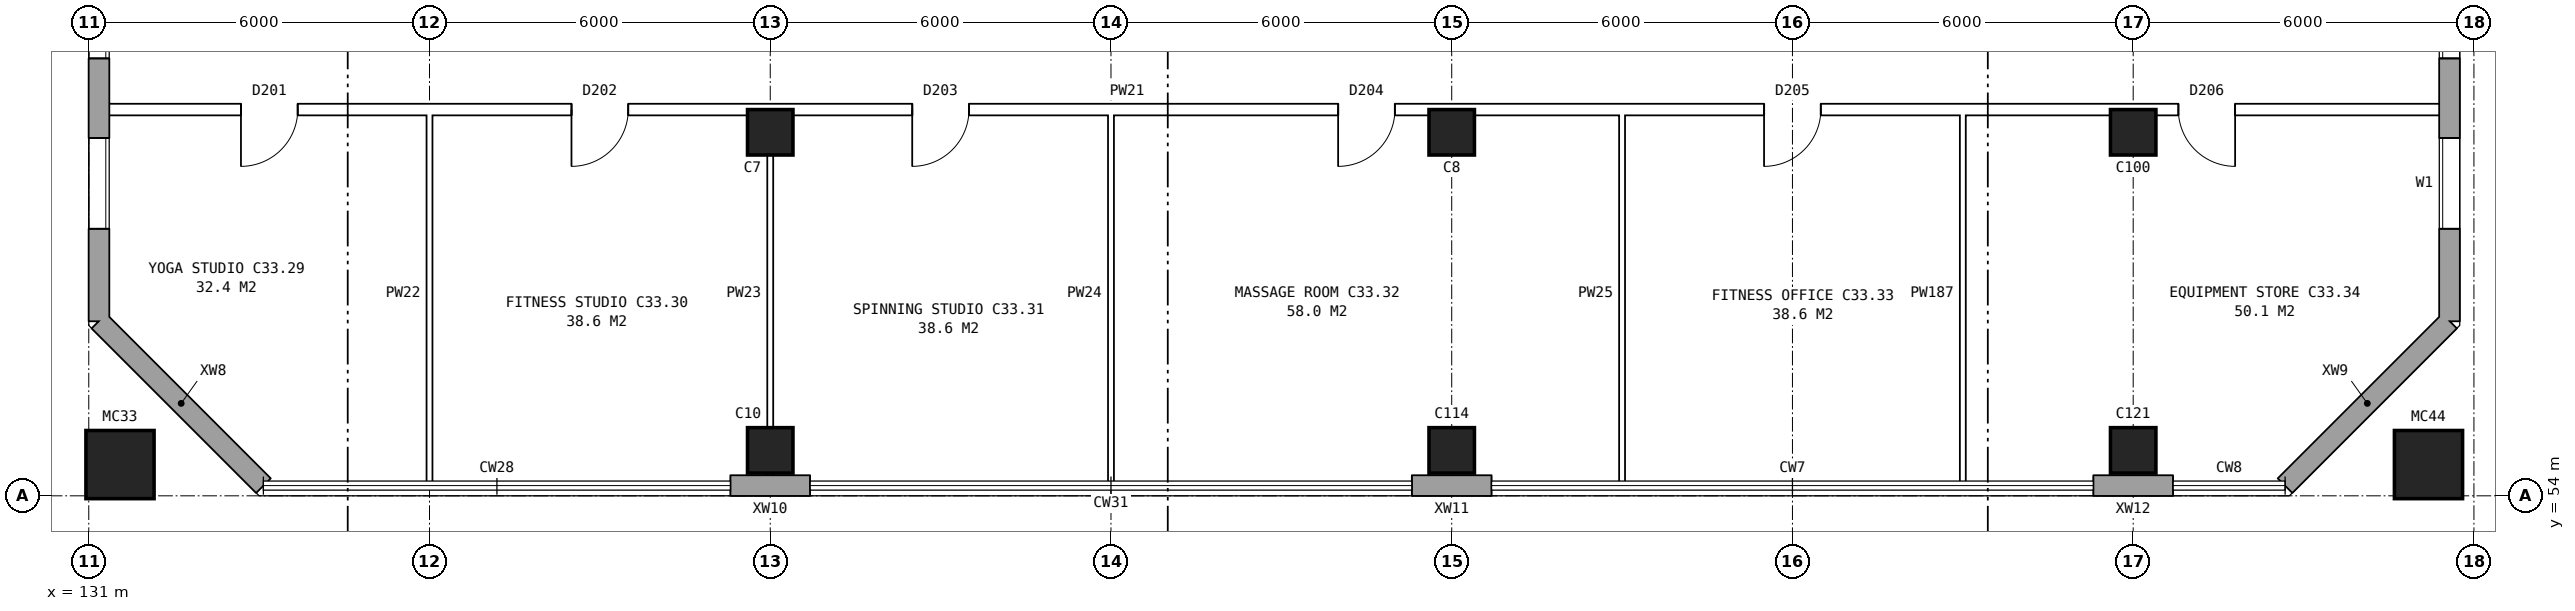
"""IFC4 building model, lengths in metres.
Left out: names, types, materials, properties, quantities, classifications, styles, units other than length and angle.
Written with IfcOpenShell. Run it as: python <this file> out.ifc"""

import sys

from ifc_helpers import new_model, si_unit, direction, frame, frame_2d, origin, origin_2d, place, context, subcontext, project, spatial, rectangle, hollow_rectangle, extrude, element, fill, save


model = new_model("IFC4")
c1 = context("Model", 3, precision=1e-05, world=origin(), true_north=direction((0.0, 1.0)))
c2 = subcontext(c1, "Body", "Model", "MODEL_VIEW")
j1 = project(units=[si_unit("LENGTHUNIT", "METRE"), si_unit("PLANEANGLEUNIT", "RADIAN")], contexts=[c1])
p1 = place(None, origin())
s1 = spatial("IfcSite", under=j1, at=p1, CompositionType="ELEMENT")
p2 = place(p1, origin())
s2 = spatial("IfcBuilding", under=s1, at=p2, CompositionType="ELEMENT")
p3 = place(p2, frame((0.0, 0.0, 119.5)))
s3 = spatial("IfcBuildingStorey", under=s2, at=p3, CompositionType="ELEMENT", Elevation=119.5)
for number, where, z_axis, x_axis in (
    (1, (143.0, 54.8, 0.0), (0.0, 0.0, 1.0), (1.0, 0.0, 0.0)),
    (2, (143.0, 60.4, 0.0), (0.0, 0.0, 1.0), (1.0, 0.0, 0.0)),
    (3, (155.0, 54.8, 0.0), (0.0, 0.0, 1.0), (1.0, 0.0, 0.0)),
    (4, (155.0, 60.4, 0.0), (0.0, 0.0, 1.0), (1.0, 0.0, 0.0)),
    (5, (167.0, 54.8, 0.0), (0.0, 0.0, 1.0), (1.0, 0.0, 0.0)),
    (6, (167.0, 60.4, 0.0), (0.0, 0.0, 1.0), (1.0, 0.0, 0.0)),
):
    element("IfcColumn", number, at=place(p3, frame(where, z_axis=z_axis, x_axis=x_axis)), inside=s3, PredefinedType="COLUMN", context=c2, shape_type="SweptSolid", body=[
        extrude(rectangle(XDim=0.8, YDim=0.8, at=origin_2d()), origin(), (0.0, 0.0, 1.0), 3.6),
    ])
for number, where, z_axis, x_axis in (
    (7, (131.55, 54.55, 0.0), (0.0, 0.0, 1.0), (1.0, 0.0, 0.0)),
    (8, (172.2, 54.55, 0.0), (0.0, 0.0, 1.0), (1.0, 0.0, 0.0)),
):
    element("IfcColumn", number, at=place(p3, frame(where, z_axis=z_axis, x_axis=x_axis)), inside=s3, PredefinedType="COLUMN", context=c2, shape_type="SweptSolid", body=[
        extrude(hollow_rectangle(XDim=1.2, YDim=1.2, WallThickness=0.065, at=origin_2d()), origin(), (0.0, 0.0, 1.0), 4.2),
    ])
p4 = place(p3, frame((131.18, 57.075, 0.0), z_axis=(0.0, 0.0, 1.0), x_axis=(0.707106781187, -0.707106781187, 0.0)))
e9 = element("IfcWall", 9, at=p4, inside=s3, PredefinedType="STANDARD", context=c2, shape_type="SweptSolid", body=[
    extrude(rectangle(XDim=4.094, YDim=0.36, at=frame_2d((2.047, 0.0))), origin(), (0.0, 0.0, 1.0), 3.6),
])
for number, where, z_axis, x_axis in (
    (10, (142.3, 54.18, 0.0), (0.0, 0.0, 1.0), (1.0, 0.0, 0.0)),
    (11, (154.3, 54.18, 0.0), (0.0, 0.0, 1.0), (1.0, 0.0, 0.0)),
    (12, (166.3, 54.18, 0.0), (0.0, 0.0, 1.0), (1.0, 0.0, 0.0)),
):
    element("IfcWall", number, at=place(p3, frame(where, z_axis=z_axis, x_axis=x_axis)), inside=s3, PredefinedType="STANDARD", context=c2, shape_type="SweptSolid", body=[
        extrude(rectangle(XDim=1.4, YDim=0.36, at=frame_2d((0.7, 0.0))), origin(), (0.0, 0.0, 1.0), 3.6),
    ])
p5 = place(p3, frame((169.675, 54.18, 0.0), z_axis=(0.0, 0.0, 1.0), x_axis=(0.707106781187, 0.707106781187, 0.0)))
e13 = element("IfcWall", 13, at=p5, inside=s3, PredefinedType="STANDARD", context=c2, shape_type="SweptSolid", body=[
    extrude(rectangle(XDim=4.094, YDim=0.36, at=frame_2d((2.047, 0.0))), origin(), (0.0, 0.0, 1.0), 3.6),
])
p6 = place(p3, frame((172.57, 57.075, 0.0), z_axis=(0.0, 0.0, 1.0), x_axis=(0.0, 1.0, 0.0)))
e14 = element("IfcWall", 14, at=p6, inside=s3, PredefinedType="STANDARD", context=c2, shape_type="SweptSolid", body=[
    extrude(rectangle(XDim=25.851, YDim=0.36, at=frame_2d((12.925, 0.0))), origin(), (0.0, 0.0, 1.0), 3.6),
])
p7 = place(p6, frame((1.625, 0.0, 0.8)))
e15 = element("IfcOpeningElement", 15, at=p7, cuts=e14, PredefinedType="OPENING", context=c2, shape_type="SweptSolid", body=[
    extrude(rectangle(XDim=1.6, YDim=1.8, at=frame_2d((0.8, 0.9))), frame((0.0, 0.19, 0.0), z_axis=(0.0, -1.0, 0.0), x_axis=(1.0, 0.0, 0.0)), (0.0, 0.0, 1.0), 0.38),
])
p8 = place(p6, frame((4.625, 0.0, 0.8)))
e16 = element("IfcOpeningElement", 16, at=p8, cuts=e14, PredefinedType="OPENING", context=c2, shape_type="SweptSolid", body=[
    extrude(rectangle(XDim=1.6, YDim=1.8, at=frame_2d((0.8, 0.9))), frame((0.0, 0.19, 0.0), z_axis=(0.0, -1.0, 0.0), x_axis=(1.0, 0.0, 0.0)), (0.0, 0.0, 1.0), 0.38),
])
p9 = place(p6, frame((7.625, 0.0, 0.8)))
e17 = element("IfcOpeningElement", 17, at=p9, cuts=e14, PredefinedType="OPENING", context=c2, shape_type="SweptSolid", body=[
    extrude(rectangle(XDim=1.6, YDim=1.8, at=frame_2d((0.8, 0.9))), frame((0.0, 0.19, 0.0), z_axis=(0.0, -1.0, 0.0), x_axis=(1.0, 0.0, 0.0)), (0.0, 0.0, 1.0), 0.38),
])
p10 = place(p6, frame((10.625, 0.0, 0.8)))
e18 = element("IfcOpeningElement", 18, at=p10, cuts=e14, PredefinedType="OPENING", context=c2, shape_type="SweptSolid", body=[
    extrude(rectangle(XDim=1.6, YDim=1.8, at=frame_2d((0.8, 0.9))), frame((0.0, 0.19, 0.0), z_axis=(0.0, -1.0, 0.0), x_axis=(1.0, 0.0, 0.0)), (0.0, 0.0, 1.0), 0.38),
])
p11 = place(p6, frame((13.625, 0.0, 0.8)))
e19 = element("IfcOpeningElement", 19, at=p11, cuts=e14, PredefinedType="OPENING", context=c2, shape_type="SweptSolid", body=[
    extrude(rectangle(XDim=1.6, YDim=1.8, at=frame_2d((0.8, 0.9))), frame((0.0, 0.19, 0.0), z_axis=(0.0, -1.0, 0.0), x_axis=(1.0, 0.0, 0.0)), (0.0, 0.0, 1.0), 0.38),
])
p12 = place(p6, frame((16.625, 0.0, 0.8)))
e20 = element("IfcOpeningElement", 20, at=p12, cuts=e14, PredefinedType="OPENING", context=c2, shape_type="SweptSolid", body=[
    extrude(rectangle(XDim=1.6, YDim=1.8, at=frame_2d((0.8, 0.9))), frame((0.0, 0.19, 0.0), z_axis=(0.0, -1.0, 0.0), x_axis=(1.0, 0.0, 0.0)), (0.0, 0.0, 1.0), 0.38),
])
p13 = place(p6, frame((19.625, 0.0, 0.8)))
e21 = element("IfcOpeningElement", 21, at=p13, cuts=e14, PredefinedType="OPENING", context=c2, shape_type="SweptSolid", body=[
    extrude(rectangle(XDim=1.6, YDim=1.8, at=frame_2d((0.8, 0.9))), frame((0.0, 0.19, 0.0), z_axis=(0.0, -1.0, 0.0), x_axis=(1.0, 0.0, 0.0)), (0.0, 0.0, 1.0), 0.38),
])
p14 = place(p6, frame((22.625, 0.0, 0.8)))
e22 = element("IfcOpeningElement", 22, at=p14, cuts=e14, PredefinedType="OPENING", context=c2, shape_type="SweptSolid", body=[
    extrude(rectangle(XDim=1.6, YDim=1.8, at=frame_2d((0.8, 0.9))), frame((0.0, 0.19, 0.0), z_axis=(0.0, -1.0, 0.0), x_axis=(1.0, 0.0, 0.0)), (0.0, 0.0, 1.0), 0.38),
])
p15 = place(p3, frame((131.18, 82.925, 0.0), z_axis=(0.0, 0.0, 1.0), x_axis=(0.0, -1.0, 0.0)))
e23 = element("IfcWall", 23, at=p15, inside=s3, PredefinedType="STANDARD", context=c2, shape_type="SweptSolid", body=[
    extrude(rectangle(XDim=25.851, YDim=0.36, at=frame_2d((12.925, 0.0))), origin(), (0.0, 0.0, 1.0), 3.6),
])
p16 = place(p15, frame((1.625, 0.0, 0.8)))
e24 = element("IfcOpeningElement", 24, at=p16, cuts=e23, PredefinedType="OPENING", context=c2, shape_type="SweptSolid", body=[
    extrude(rectangle(XDim=1.6, YDim=1.8, at=frame_2d((0.8, 0.9))), frame((0.0, 0.19, 0.0), z_axis=(0.0, -1.0, 0.0), x_axis=(1.0, 0.0, 0.0)), (0.0, 0.0, 1.0), 0.38),
])
p17 = place(p15, frame((4.625, 0.0, 0.8)))
e25 = element("IfcOpeningElement", 25, at=p17, cuts=e23, PredefinedType="OPENING", context=c2, shape_type="SweptSolid", body=[
    extrude(rectangle(XDim=1.6, YDim=1.8, at=frame_2d((0.8, 0.9))), frame((0.0, 0.19, 0.0), z_axis=(0.0, -1.0, 0.0), x_axis=(1.0, 0.0, 0.0)), (0.0, 0.0, 1.0), 0.38),
])
p18 = place(p15, frame((19.625, 0.0, 0.8)))
e26 = element("IfcOpeningElement", 26, at=p18, cuts=e23, PredefinedType="OPENING", context=c2, shape_type="SweptSolid", body=[
    extrude(rectangle(XDim=1.6, YDim=1.8, at=frame_2d((0.8, 0.9))), frame((0.0, 0.19, 0.0), z_axis=(0.0, -1.0, 0.0), x_axis=(1.0, 0.0, 0.0)), (0.0, 0.0, 1.0), 0.38),
])
p19 = place(p15, frame((22.625, 0.0, 0.8)))
e27 = element("IfcOpeningElement", 27, at=p19, cuts=e23, PredefinedType="OPENING", context=c2, shape_type="SweptSolid", body=[
    extrude(rectangle(XDim=1.6, YDim=1.8, at=frame_2d((0.8, 0.9))), frame((0.0, 0.19, 0.0), z_axis=(0.0, -1.0, 0.0), x_axis=(1.0, 0.0, 0.0)), (0.0, 0.0, 1.0), 0.38),
])
p20 = place(p3, frame((131.24, 60.8, 0.0), z_axis=(0.0, 0.0, 1.0), x_axis=(1.0, 0.0, 0.0)))
e28 = element("IfcWall", 28, at=p20, inside=s3, PredefinedType="PARTITIONING", context=c2, shape_type="SweptSolid", body=[
    extrude(rectangle(XDim=41.27, YDim=0.2, at=frame_2d((20.635, 0.0))), origin(), (0.0, 0.0, 1.0), 3.6),
])
p21 = place(p20, frame((2.44, 0.0, 0.0)))
e29 = element("IfcOpeningElement", 29, at=p21, cuts=e28, PredefinedType="OPENING", context=c2, shape_type="SweptSolid", body=[
    extrude(rectangle(XDim=1.0, YDim=2.1, at=frame_2d((0.5, 1.05))), frame((0.0, 0.11, 0.0), z_axis=(0.0, -1.0, 0.0), x_axis=(1.0, 0.0, 0.0)), (0.0, 0.0, 1.0), 0.22),
])
p22 = place(p20, frame((8.26, 0.0, 0.0)))
e30 = element("IfcOpeningElement", 30, at=p22, cuts=e28, PredefinedType="OPENING", context=c2, shape_type="SweptSolid", body=[
    extrude(rectangle(XDim=1.0, YDim=2.1, at=frame_2d((0.5, 1.05))), frame((0.0, 0.11, 0.0), z_axis=(0.0, -1.0, 0.0), x_axis=(1.0, 0.0, 0.0)), (0.0, 0.0, 1.0), 0.22),
])
p23 = place(p20, frame((14.26, 0.0, 0.0)))
e31 = element("IfcOpeningElement", 31, at=p23, cuts=e28, PredefinedType="OPENING", context=c2, shape_type="SweptSolid", body=[
    extrude(rectangle(XDim=1.0, YDim=2.1, at=frame_2d((0.5, 1.05))), frame((0.0, 0.11, 0.0), z_axis=(0.0, -1.0, 0.0), x_axis=(1.0, 0.0, 0.0)), (0.0, 0.0, 1.0), 0.22),
])
p24 = place(p20, frame((21.76, 0.0, 0.0)))
e32 = element("IfcOpeningElement", 32, at=p24, cuts=e28, PredefinedType="OPENING", context=c2, shape_type="SweptSolid", body=[
    extrude(rectangle(XDim=1.0, YDim=2.1, at=frame_2d((0.5, 1.05))), frame((0.0, 0.11, 0.0), z_axis=(0.0, -1.0, 0.0), x_axis=(1.0, 0.0, 0.0)), (0.0, 0.0, 1.0), 0.22),
])
p25 = place(p20, frame((29.26, 0.0, 0.0)))
e33 = element("IfcOpeningElement", 33, at=p25, cuts=e28, PredefinedType="OPENING", context=c2, shape_type="SweptSolid", body=[
    extrude(rectangle(XDim=1.0, YDim=2.1, at=frame_2d((0.5, 1.05))), frame((0.0, 0.11, 0.0), z_axis=(0.0, -1.0, 0.0), x_axis=(1.0, 0.0, 0.0)), (0.0, 0.0, 1.0), 0.22),
])
p26 = place(p20, frame((36.555, 0.0, 0.0)))
e34 = element("IfcOpeningElement", 34, at=p26, cuts=e28, PredefinedType="OPENING", context=c2, shape_type="SweptSolid", body=[
    extrude(rectangle(XDim=1.0, YDim=2.1, at=frame_2d((0.5, 1.05))), frame((0.0, 0.11, 0.0), z_axis=(0.0, -1.0, 0.0), x_axis=(1.0, 0.0, 0.0)), (0.0, 0.0, 1.0), 0.22),
])
for number, where, z_axis, x_axis in (
    (35, (137.0, 54.24, 0.0), (0.0, 0.0, 1.0), (0.0, 1.0, 0.0)),
    (36, (143.0, 54.24, 0.0), (0.0, 0.0, 1.0), (0.0, 1.0, 0.0)),
    (37, (149.0, 54.24, 0.0), (0.0, 0.0, 1.0), (0.0, 1.0, 0.0)),
    (38, (158.0, 54.24, 0.0), (0.0, 0.0, 1.0), (0.0, 1.0, 0.0)),
    (39, (164.0, 54.24, 0.0), (0.0, 0.0, 1.0), (0.0, 1.0, 0.0)),
):
    element("IfcWall", number, at=place(p3, frame(where, z_axis=z_axis, x_axis=x_axis)), inside=s3, PredefinedType="PARTITIONING", context=c2, shape_type="SweptSolid", body=[
        extrude(rectangle(XDim=6.66, YDim=0.1, at=frame_2d((3.33, 0.0))), origin(), (0.0, 0.0, 1.0), 3.6),
    ])
p27 = place(p7, origin())
e40 = element("IfcWindow", 40, at=p27, inside=s3, PartitioningType="SINGLE_PANEL", PredefinedType="WINDOW", context=c2, shape_type="SweptSolid", body=[
    extrude(rectangle(XDim=1.6, YDim=1.8, at=frame_2d((0.8, 0.9))), frame((0.0, 0.15, 0.0), z_axis=(0.0, -1.0, 0.0), x_axis=(1.0, 0.0, 0.0)), (0.0, 0.0, 1.0), 0.06),
])
fill(e15, e40)
p28 = place(p8, origin())
e41 = element("IfcWindow", 41, at=p28, inside=s3, PartitioningType="SINGLE_PANEL", PredefinedType="WINDOW", context=c2, shape_type="SweptSolid", body=[
    extrude(rectangle(XDim=1.6, YDim=1.8, at=frame_2d((0.8, 0.9))), frame((0.0, 0.15, 0.0), z_axis=(0.0, -1.0, 0.0), x_axis=(1.0, 0.0, 0.0)), (0.0, 0.0, 1.0), 0.06),
])
fill(e16, e41)
p29 = place(p18, origin())
e42 = element("IfcWindow", 42, at=p29, inside=s3, PartitioningType="SINGLE_PANEL", PredefinedType="WINDOW", context=c2, shape_type="SweptSolid", body=[
    extrude(rectangle(XDim=1.6, YDim=1.8, at=frame_2d((0.8, 0.9))), frame((0.0, 0.15, 0.0), z_axis=(0.0, -1.0, 0.0), x_axis=(1.0, 0.0, 0.0)), (0.0, 0.0, 1.0), 0.06),
])
fill(e26, e42)
p30 = place(p19, origin())
e43 = element("IfcWindow", 43, at=p30, inside=s3, PartitioningType="SINGLE_PANEL", PredefinedType="WINDOW", context=c2, shape_type="SweptSolid", body=[
    extrude(rectangle(XDim=1.6, YDim=1.8, at=frame_2d((0.8, 0.9))), frame((0.0, 0.15, 0.0), z_axis=(0.0, -1.0, 0.0), x_axis=(1.0, 0.0, 0.0)), (0.0, 0.0, 1.0), 0.06),
])
fill(e27, e43)
p31 = place(p21, frame((1.0, 0.0, 0.0), z_axis=(0.0, 0.0, 1.0), x_axis=(-1.0, 0.0, 0.0)))
e44 = element("IfcDoor", 44, at=p31, inside=s3, OperationType="SINGLE_SWING_RIGHT", PredefinedType="DOOR", context=c2, shape_type="SweptSolid", body=[
    extrude(rectangle(XDim=1.0, YDim=2.1, at=frame_2d((0.5, 1.05))), frame((0.0, 0.025, 0.0), z_axis=(0.0, -1.0, 0.0), x_axis=(1.0, 0.0, 0.0)), (0.0, 0.0, 1.0), 0.05),
])
fill(e29, e44)
p32 = place(p22, frame((1.0, 0.0, 0.0), z_axis=(0.0, 0.0, 1.0), x_axis=(-1.0, 0.0, 0.0)))
e45 = element("IfcDoor", 45, at=p32, inside=s3, OperationType="SINGLE_SWING_RIGHT", PredefinedType="DOOR", context=c2, shape_type="SweptSolid", body=[
    extrude(rectangle(XDim=1.0, YDim=2.1, at=frame_2d((0.5, 1.05))), frame((0.0, 0.025, 0.0), z_axis=(0.0, -1.0, 0.0), x_axis=(1.0, 0.0, 0.0)), (0.0, 0.0, 1.0), 0.05),
])
fill(e30, e45)
p33 = place(p23, frame((1.0, 0.0, 0.0), z_axis=(0.0, 0.0, 1.0), x_axis=(-1.0, 0.0, 0.0)))
e46 = element("IfcDoor", 46, at=p33, inside=s3, OperationType="SINGLE_SWING_RIGHT", PredefinedType="DOOR", context=c2, shape_type="SweptSolid", body=[
    extrude(rectangle(XDim=1.0, YDim=2.1, at=frame_2d((0.5, 1.05))), frame((0.0, 0.025, 0.0), z_axis=(0.0, -1.0, 0.0), x_axis=(1.0, 0.0, 0.0)), (0.0, 0.0, 1.0), 0.05),
])
fill(e31, e46)
p34 = place(p24, frame((1.0, 0.0, 0.0), z_axis=(0.0, 0.0, 1.0), x_axis=(-1.0, 0.0, 0.0)))
e47 = element("IfcDoor", 47, at=p34, inside=s3, OperationType="SINGLE_SWING_RIGHT", PredefinedType="DOOR", context=c2, shape_type="SweptSolid", body=[
    extrude(rectangle(XDim=1.0, YDim=2.1, at=frame_2d((0.5, 1.05))), frame((0.0, 0.025, 0.0), z_axis=(0.0, -1.0, 0.0), x_axis=(1.0, 0.0, 0.0)), (0.0, 0.0, 1.0), 0.05),
])
fill(e32, e47)
p35 = place(p25, frame((1.0, 0.0, 0.0), z_axis=(0.0, 0.0, 1.0), x_axis=(-1.0, 0.0, 0.0)))
e48 = element("IfcDoor", 48, at=p35, inside=s3, OperationType="SINGLE_SWING_RIGHT", PredefinedType="DOOR", context=c2, shape_type="SweptSolid", body=[
    extrude(rectangle(XDim=1.0, YDim=2.1, at=frame_2d((0.5, 1.05))), frame((0.0, 0.025, 0.0), z_axis=(0.0, -1.0, 0.0), x_axis=(1.0, 0.0, 0.0)), (0.0, 0.0, 1.0), 0.05),
])
fill(e33, e48)
p36 = place(p26, frame((1.0, 0.0, 0.0), z_axis=(0.0, 0.0, 1.0), x_axis=(-1.0, 0.0, 0.0)))
e49 = element("IfcDoor", 49, at=p36, inside=s3, OperationType="SINGLE_SWING_LEFT", PredefinedType="DOOR", context=c2, shape_type="SweptSolid", body=[
    extrude(rectangle(XDim=1.0, YDim=2.1, at=frame_2d((0.5, 1.05))), frame((0.0, 0.025, 0.0), z_axis=(0.0, -1.0, 0.0), x_axis=(1.0, 0.0, 0.0)), (0.0, 0.0, 1.0), 0.05),
])
fill(e34, e49)
save(model, sys.argv[1])
